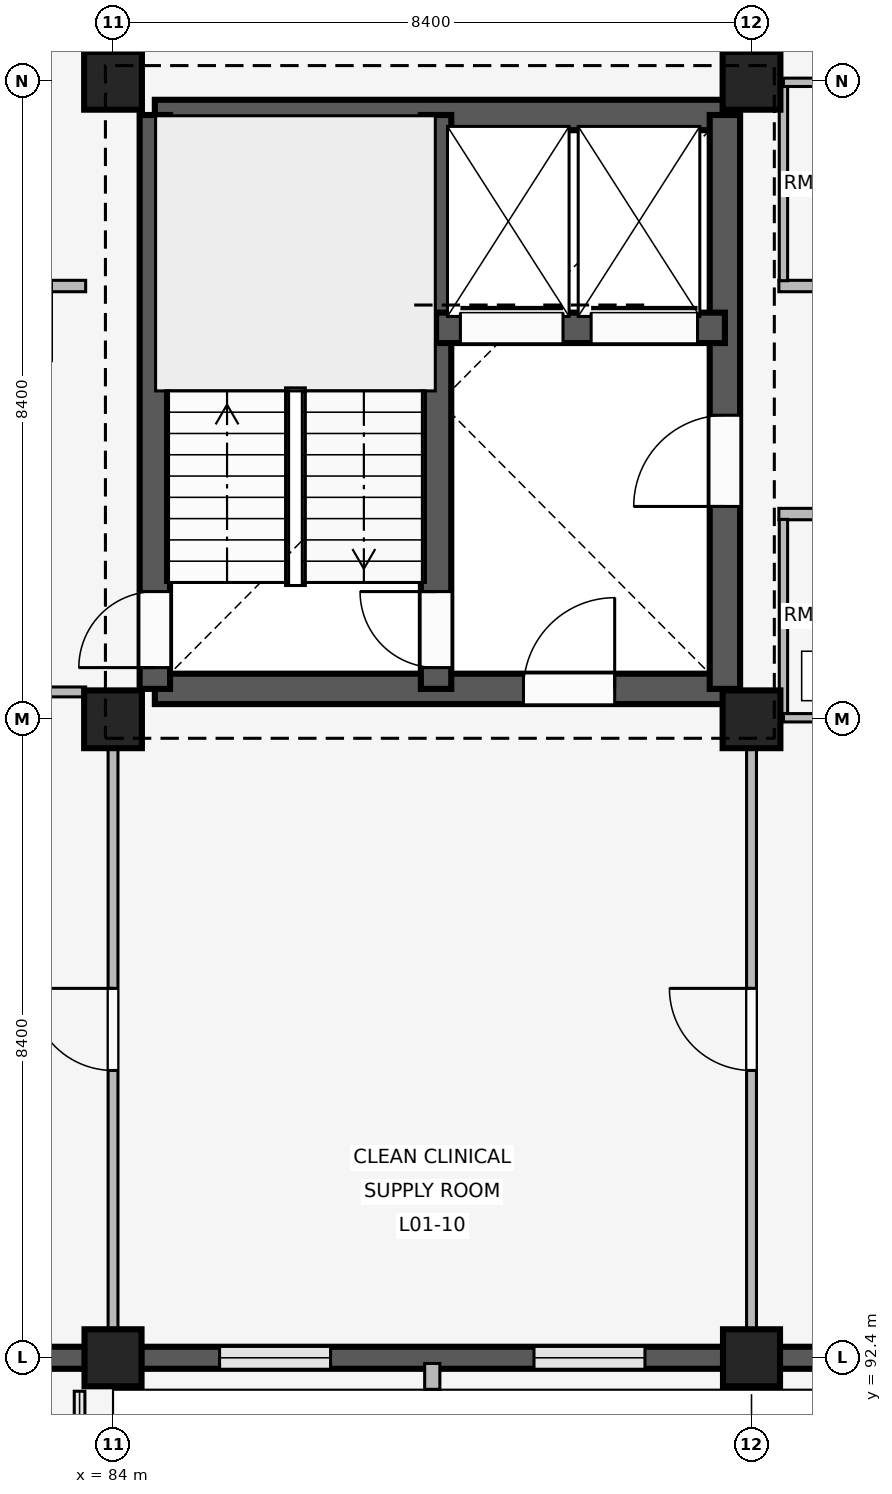
"""IFC4 building model, lengths in metres.
Left out: names, types, materials, properties, quantities, classifications, styles, units other than length and angle.
Written with IfcOpenShell. Run it as: python <this file> out.ifc"""

import sys

from ifc_helpers import new_model, si_unit, direction, frame, frame_2d, origin, origin_2d, place, context, subcontext, project, spatial, rectangle, extrude, element, fill, save


model = new_model("IFC4")
c1 = context("Model", 3, precision=1e-05, world=origin(), true_north=direction((0.0, 1.0)))
c2 = subcontext(c1, "Body", "Model", "MODEL_VIEW")
j1 = project(units=[si_unit("LENGTHUNIT", "METRE"), si_unit("PLANEANGLEUNIT", "RADIAN")], contexts=[c1])
p1 = place(None, origin())
s1 = spatial("IfcSite", under=j1, at=p1, CompositionType="ELEMENT")
p2 = place(p1, origin())
s2 = spatial("IfcBuilding", under=s1, at=p2, CompositionType="ELEMENT")
p3 = place(p2, frame((0.0, 0.0, 4.8)))
s3 = spatial("IfcBuildingStorey", under=s2, at=p3, CompositionType="ELEMENT", Elevation=4.8)
p4 = place(p3, frame((84.0, 92.4, 0.0), z_axis=(0.0, 0.0, 1.0), x_axis=(1.0, 0.0, 0.0)))
e1 = element("IfcColumn", 1, at=p4, inside=s3, PredefinedType="COLUMN", context=c2, shape_type="SweptSolid", body=[
    extrude(rectangle(XDim=0.75, YDim=0.75, at=origin_2d()), origin(), (0.0, 0.0, 1.0), 3.3),
])
for number, where, z_axis, x_axis in (
    (2, (84.0, 100.8, 0.0), (0.0, 0.0, 1.0), (1.0, 0.0, 0.0)),
    (3, (84.0, 109.2, 0.0), (0.0, 0.0, 1.0), (1.0, 0.0, 0.0)),
):
    element("IfcColumn", number, at=place(p3, frame(where, z_axis=z_axis, x_axis=x_axis)), inside=s3, PredefinedType="COLUMN", context=c2, shape_type="SweptSolid", body=[
        extrude(rectangle(XDim=0.76, YDim=0.76, at=origin_2d()), origin(), (0.0, 0.0, 1.0), 3.3),
    ])
p5 = place(p3, frame((92.4, 92.4, 0.0), z_axis=(0.0, 0.0, 1.0), x_axis=(1.0, 0.0, 0.0)))
e4 = element("IfcColumn", 4, at=p5, inside=s3, PredefinedType="COLUMN", context=c2, shape_type="SweptSolid", body=[
    extrude(rectangle(XDim=0.75, YDim=0.75, at=origin_2d()), origin(), (0.0, 0.0, 1.0), 3.3),
])
for number, where, z_axis, x_axis in (
    (5, (92.4, 100.8, 0.0), (0.0, 0.0, 1.0), (1.0, 0.0, 0.0)),
    (6, (92.4, 109.2, 0.0), (0.0, 0.0, 1.0), (1.0, 0.0, 0.0)),
):
    element("IfcColumn", number, at=place(p3, frame(where, z_axis=z_axis, x_axis=x_axis)), inside=s3, PredefinedType="COLUMN", context=c2, shape_type="SweptSolid", body=[
        extrude(rectangle(XDim=0.76, YDim=0.76, at=origin_2d()), origin(), (0.0, 0.0, 1.0), 3.3),
    ])
p6 = place(p3, frame((83.63, 92.4, 0.0), z_axis=(0.0, 0.0, 1.0), x_axis=(-1.0, 0.0, 0.0)))
e7 = element("IfcWall", 7, at=p6, inside=s3, PredefinedType="SOLIDWALL", context=c2, shape_type="SweptSolid", body=[
    extrude(rectangle(XDim=7.66, YDim=0.29, at=frame_2d((3.83, 0.0))), origin(), (0.0, 0.0, 1.0), 2.42),
])
p7 = place(p6, frame((2.88, 0.0, 0.0)))
e8 = element("IfcOpeningElement", 8, at=p7, cuts=e7, PredefinedType="OPENING", context=c2, shape_type="SweptSolid", body=[
    extrude(rectangle(XDim=1.9, YDim=2.3, at=frame_2d((0.95, 1.15))), frame((0.0, 0.155, 0.0), z_axis=(0.0, -1.0, 0.0), x_axis=(1.0, 0.0, 0.0)), (0.0, 0.0, 1.0), 0.31),
])
p8 = place(p3, frame((92.03, 92.4, 0.0), z_axis=(0.0, 0.0, 1.0), x_axis=(-1.0, 0.0, 0.0)))
e9 = element("IfcWall", 9, at=p8, inside=s3, PredefinedType="SOLIDWALL", context=c2, shape_type="SweptSolid", body=[
    extrude(rectangle(XDim=7.66, YDim=0.29, at=frame_2d((3.83, 0.0))), origin(), (0.0, 0.0, 1.0), 2.42),
])
p9 = place(p8, frame((1.032, 0.0, 0.85)))
e10 = element("IfcOpeningElement", 10, at=p9, cuts=e9, PredefinedType="OPENING", context=c2, shape_type="SweptSolid", body=[
    extrude(rectangle(XDim=1.46, YDim=0.85, at=frame_2d((0.73, 0.425))), frame((0.0, 0.155, 0.0), z_axis=(0.0, -1.0, 0.0), x_axis=(1.0, 0.0, 0.0)), (0.0, 0.0, 1.0), 0.31),
])
p10 = place(p8, frame((5.168, 0.0, 0.85)))
e11 = element("IfcOpeningElement", 11, at=p10, cuts=e9, PredefinedType="OPENING", context=c2, shape_type="SweptSolid", body=[
    extrude(rectangle(XDim=1.46, YDim=0.85, at=frame_2d((0.73, 0.425))), frame((0.0, 0.155, 0.0), z_axis=(0.0, -1.0, 0.0), x_axis=(1.0, 0.0, 0.0)), (0.0, 0.0, 1.0), 0.31),
])
p11 = place(p3, frame((88.2, 92.325, 0.0), z_axis=(0.0, 0.0, 1.0), x_axis=(0.0, -1.0, 0.0)))
e12 = element("IfcWall", 12, at=p11, inside=s3, PredefinedType="ELEMENTEDWALL", context=c2, shape_type="SweptSolid", body=[
    extrude(rectangle(XDim=0.34, YDim=0.2, at=frame_2d((0.17, 0.0))), origin(), (0.0, 0.0, 1.0), 2.4),
])
p12 = place(p3, frame((100.43, 92.4, 0.0), z_axis=(0.0, 0.0, 1.0), x_axis=(-1.0, 0.0, 0.0)))
e13 = element("IfcWall", 13, at=p12, inside=s3, PredefinedType="SOLIDWALL", context=c2, shape_type="SweptSolid", body=[
    extrude(rectangle(XDim=7.66, YDim=0.29, at=frame_2d((3.83, 0.0))), origin(), (0.0, 0.0, 1.0), 2.42),
])
p13 = place(p12, frame((0.952, 0.0, 0.85)))
e14 = element("IfcOpeningElement", 14, at=p13, cuts=e13, PredefinedType="OPENING", context=c2, shape_type="SweptSolid", body=[
    extrude(rectangle(XDim=1.62, YDim=0.95, at=frame_2d((0.81, 0.475))), frame((0.0, 0.155, 0.0), z_axis=(0.0, -1.0, 0.0), x_axis=(1.0, 0.0, 0.0)), (0.0, 0.0, 1.0), 0.31),
])
p14 = place(p12, frame((5.088, 0.0, 0.85)))
e15 = element("IfcOpeningElement", 15, at=p14, cuts=e13, PredefinedType="OPENING", context=c2, shape_type="SweptSolid", body=[
    extrude(rectangle(XDim=1.62, YDim=0.95, at=frame_2d((0.81, 0.475))), frame((0.0, 0.155, 0.0), z_axis=(0.0, -1.0, 0.0), x_axis=(1.0, 0.0, 0.0)), (0.0, 0.0, 1.0), 0.31),
])
p15 = place(p3, frame((84.55, 101.2, 0.0), z_axis=(0.0, 0.0, 1.0), x_axis=(1.0, 0.0, 0.0)))
e16 = element("IfcWall", 16, at=p15, inside=s3, PredefinedType="SHEAR", context=c2, shape_type="SweptSolid", body=[
    extrude(rectangle(XDim=7.5, YDim=0.4, at=frame_2d((3.75, 0.0))), origin(), (0.0, 0.0, 1.0), 3.02),
])
p16 = place(p15, frame((4.85, 0.0, 0.0)))
e17 = element("IfcOpeningElement", 17, at=p16, cuts=e16, PredefinedType="OPENING", context=c2, shape_type="SweptSolid", body=[
    extrude(rectangle(XDim=1.2, YDim=2.1, at=frame_2d((0.6, 1.05))), frame((0.0, 0.21, 0.0), z_axis=(0.0, -1.0, 0.0), x_axis=(1.0, 0.0, 0.0)), (0.0, 0.0, 1.0), 0.42),
])
p17 = place(p3, frame((84.55, 108.75, 0.0), z_axis=(0.0, 0.0, 1.0), x_axis=(1.0, 0.0, 0.0)))
e18 = element("IfcWall", 18, at=p17, inside=s3, PredefinedType="SHEAR", context=c2, shape_type="SweptSolid", body=[
    extrude(rectangle(XDim=7.5, YDim=0.4, at=frame_2d((3.75, 0.0))), origin(), (0.0, 0.0, 1.0), 3.02),
])
p18 = place(p3, frame((84.55, 101.2, 0.0), z_axis=(0.0, 0.0, 1.0), x_axis=(0.0, 1.0, 0.0)))
e19 = element("IfcWall", 19, at=p18, inside=s3, PredefinedType="SHEAR", context=c2, shape_type="SweptSolid", body=[
    extrude(rectangle(XDim=7.55, YDim=0.4, at=frame_2d((3.775, 0.0))), origin(), (0.0, 0.0, 1.0), 3.02),
])
p19 = place(p18, frame((0.28, 0.0, 0.0)))
e20 = element("IfcOpeningElement", 20, at=p19, cuts=e19, PredefinedType="OPENING", context=c2, shape_type="SweptSolid", body=[
    extrude(rectangle(XDim=1.0, YDim=2.15, at=frame_2d((0.5, 1.075))), frame((0.0, 0.21, 0.0), z_axis=(0.0, -1.0, 0.0), x_axis=(1.0, 0.0, 0.0)), (0.0, 0.0, 1.0), 0.42),
])
p20 = place(p3, frame((92.05, 101.2, 0.0), z_axis=(0.0, 0.0, 1.0), x_axis=(0.0, 1.0, 0.0)))
e21 = element("IfcWall", 21, at=p20, inside=s3, PredefinedType="SHEAR", context=c2, shape_type="SweptSolid", body=[
    extrude(rectangle(XDim=7.55, YDim=0.4, at=frame_2d((3.775, 0.0))), origin(), (0.0, 0.0, 1.0), 3.02),
])
p21 = place(p20, frame((2.4, 0.0, 0.0)))
e22 = element("IfcOpeningElement", 22, at=p21, cuts=e21, PredefinedType="OPENING", context=c2, shape_type="SweptSolid", body=[
    extrude(rectangle(XDim=1.2, YDim=2.2, at=frame_2d((0.6, 1.1))), frame((0.0, 0.21, 0.0), z_axis=(0.0, -1.0, 0.0), x_axis=(1.0, 0.0, 0.0)), (0.0, 0.0, 1.0), 0.42),
])
p22 = place(p3, frame((88.25, 101.2, 0.0), z_axis=(0.0, 0.0, 1.0), x_axis=(0.0, 1.0, 0.0)))
e23 = element("IfcWall", 23, at=p22, inside=s3, PredefinedType="SHEAR", context=c2, shape_type="SweptSolid", body=[
    extrude(rectangle(XDim=7.55, YDim=0.4, at=frame_2d((3.775, 0.0))), origin(), (0.0, 0.0, 1.0), 3.02),
])
p23 = place(p22, frame((0.28, 0.0, 0.0)))
e24 = element("IfcOpeningElement", 24, at=p23, cuts=e23, PredefinedType="OPENING", context=c2, shape_type="SweptSolid", body=[
    extrude(rectangle(XDim=1.0, YDim=2.15, at=frame_2d((0.5, 1.075))), frame((0.0, 0.21, 0.0), z_axis=(0.0, -1.0, 0.0), x_axis=(1.0, 0.0, 0.0)), (0.0, 0.0, 1.0), 0.42),
])
p24 = place(p3, frame((88.25, 105.95, 0.0), z_axis=(0.0, 0.0, 1.0), x_axis=(1.0, 0.0, 0.0)))
e25 = element("IfcWall", 25, at=p24, inside=s3, PredefinedType="SHEAR", context=c2, shape_type="SweptSolid", body=[
    extrude(rectangle(XDim=3.8, YDim=0.4, at=frame_2d((1.9, 0.0))), origin(), (0.0, 0.0, 1.0), 3.02),
])
p25 = place(p24, frame((0.32, 0.0, 0.0)))
e26 = element("IfcOpeningElement", 26, at=p25, cuts=e25, PredefinedType="OPENING", context=c2, shape_type="SweptSolid", body=[
    extrude(rectangle(XDim=1.35, YDim=2.25, at=frame_2d((0.675, 1.125))), frame((0.0, 0.21, 0.0), z_axis=(0.0, -1.0, 0.0), x_axis=(1.0, 0.0, 0.0)), (0.0, 0.0, 1.0), 0.42),
])
p26 = place(p24, frame((2.04, 0.0, 0.0)))
e27 = element("IfcOpeningElement", 27, at=p26, cuts=e25, PredefinedType="OPENING", context=c2, shape_type="SweptSolid", body=[
    extrude(rectangle(XDim=1.4, YDim=2.25, at=frame_2d((0.7, 1.125))), frame((0.0, 0.21, 0.0), z_axis=(0.0, -1.0, 0.0), x_axis=(1.0, 0.0, 0.0)), (0.0, 0.0, 1.0), 0.42),
])
p27 = place(p3, frame((81.46, 101.16, 0.0), z_axis=(0.0, 0.0, 1.0), x_axis=(1.0, 0.0, 0.0)))
e28 = element("IfcWall", 28, at=p27, inside=s3, PredefinedType="PARTITIONING", context=c2, shape_type="SweptSolid", body=[
    extrude(rectangle(XDim=2.18, YDim=0.13, at=frame_2d((1.09, 0.0))), origin(), (0.0, 0.0, 1.0), 2.4),
])
p28 = place(p3, frame((83.64, 106.5, 0.0), z_axis=(0.0, 0.0, 1.0), x_axis=(-1.0, 0.0, 0.0)))
e29 = element("IfcWall", 29, at=p28, inside=s3, PredefinedType="PARTITIONING", context=c2, shape_type="SweptSolid", body=[
    extrude(rectangle(XDim=7.96, YDim=0.15, at=frame_2d((3.98, 0.0))), origin(), (0.0, 0.0, 1.0), 2.4),
])
p29 = place(p28, frame((0.45, 0.0, 0.0)))
e30 = element("IfcOpeningElement", 30, at=p29, cuts=e29, PredefinedType="OPENING", context=c2, shape_type="SweptSolid", body=[
    extrude(rectangle(XDim=1.0, YDim=2.15, at=frame_2d((0.5, 1.075))), frame((0.0, 0.085, 0.0), z_axis=(0.0, -1.0, 0.0), x_axis=(1.0, 0.0, 0.0)), (0.0, 0.0, 1.0), 0.17),
])
p30 = place(p28, frame((4.15, 0.0, 0.0)))
e31 = element("IfcOpeningElement", 31, at=p30, cuts=e29, PredefinedType="OPENING", context=c2, shape_type="SweptSolid", body=[
    extrude(rectangle(XDim=1.0, YDim=2.15, at=frame_2d((0.5, 1.075))), frame((0.0, 0.085, 0.0), z_axis=(0.0, -1.0, 0.0), x_axis=(1.0, 0.0, 0.0)), (0.0, 0.0, 1.0), 0.17),
])
p31 = place(p3, frame((84.0, 92.54, 0.0), z_axis=(0.0, 0.0, 1.0), x_axis=(0.0, 1.0, 0.0)))
e32 = element("IfcWall", 32, at=p31, inside=s3, PredefinedType="PARTITIONING", context=c2, shape_type="SweptSolid", body=[
    extrude(rectangle(XDim=8.21, YDim=0.13, at=frame_2d((4.105, 0.0))), origin(), (0.0, 0.0, 1.0), 2.4),
])
p32 = place(p31, frame((3.64, 0.0, 0.0)))
e33 = element("IfcOpeningElement", 33, at=p32, cuts=e32, PredefinedType="OPENING", context=c2, shape_type="SweptSolid", body=[
    extrude(rectangle(XDim=1.08, YDim=2.15, at=frame_2d((0.54, 1.075))), frame((0.0, 0.075, 0.0), z_axis=(0.0, -1.0, 0.0), x_axis=(1.0, 0.0, 0.0)), (0.0, 0.0, 1.0), 0.15),
])
p33 = place(p3, frame((84.0, 109.55, 0.0), z_axis=(0.0, 0.0, 1.0), x_axis=(0.0, 1.0, 0.0)))
e34 = element("IfcWall", 34, at=p33, inside=s3, PredefinedType="PARTITIONING", context=c2, shape_type="SweptSolid", body=[
    extrude(rectangle(XDim=7.91, YDim=0.13, at=frame_2d((3.955, 0.0))), origin(), (0.0, 0.0, 1.0), 2.4),
])
p34 = place(p33, frame((3.4, 0.0, 0.0)))
e35 = element("IfcOpeningElement", 35, at=p34, cuts=e34, PredefinedType="OPENING", context=c2, shape_type="SweptSolid", body=[
    extrude(rectangle(XDim=1.05, YDim=2.2, at=frame_2d((0.525, 1.1))), frame((0.0, 0.075, 0.0), z_axis=(0.0, -1.0, 0.0), x_axis=(1.0, 0.0, 0.0)), (0.0, 0.0, 1.0), 0.15),
])
p35 = place(p3, frame((92.4, 92.54, 0.0), z_axis=(0.0, 0.0, 1.0), x_axis=(0.0, 1.0, 0.0)))
e36 = element("IfcWall", 36, at=p35, inside=s3, PredefinedType="PARTITIONING", context=c2, shape_type="SweptSolid", body=[
    extrude(rectangle(XDim=8.21, YDim=0.13, at=frame_2d((4.105, 0.0))), origin(), (0.0, 0.0, 1.0), 2.4),
])
p36 = place(p35, frame((3.64, 0.0, 0.0)))
e37 = element("IfcOpeningElement", 37, at=p36, cuts=e36, PredefinedType="OPENING", context=c2, shape_type="SweptSolid", body=[
    extrude(rectangle(XDim=1.08, YDim=2.15, at=frame_2d((0.54, 1.075))), frame((0.0, 0.075, 0.0), z_axis=(0.0, -1.0, 0.0), x_axis=(1.0, 0.0, 0.0)), (0.0, 0.0, 1.0), 0.15),
])
p37 = place(p3, frame((92.4, 109.55, 0.0), z_axis=(0.0, 0.0, 1.0), x_axis=(0.0, 1.0, 0.0)))
e38 = element("IfcWall", 38, at=p37, inside=s3, PredefinedType="PARTITIONING", context=c2, shape_type="SweptSolid", body=[
    extrude(rectangle(XDim=7.91, YDim=0.13, at=frame_2d((3.955, 0.0))), origin(), (0.0, 0.0, 1.0), 2.4),
])
p38 = place(p37, frame((3.4, 0.0, 0.0)))
e39 = element("IfcOpeningElement", 39, at=p38, cuts=e38, PredefinedType="OPENING", context=c2, shape_type="SweptSolid", body=[
    extrude(rectangle(XDim=1.05, YDim=2.2, at=frame_2d((0.525, 1.1))), frame((0.0, 0.075, 0.0), z_axis=(0.0, -1.0, 0.0), x_axis=(1.0, 0.0, 0.0)), (0.0, 0.0, 1.0), 0.15),
])
p39 = place(p3, frame((92.76, 103.5, 0.0), z_axis=(0.0, 0.0, 1.0), x_axis=(1.0, 0.0, 0.0)))
e40 = element("IfcWall", 40, at=p39, inside=s3, PredefinedType="PARTITIONING", context=c2, shape_type="SweptSolid", body=[
    extrude(rectangle(XDim=7.96, YDim=0.15, at=frame_2d((3.98, 0.0))), origin(), (0.0, 0.0, 1.0), 2.4),
])
p40 = place(p39, frame((2.25, 0.0, 0.0)))
e41 = element("IfcOpeningElement", 41, at=p40, cuts=e40, PredefinedType="OPENING", context=c2, shape_type="SweptSolid", body=[
    extrude(rectangle(XDim=1.0, YDim=2.15, at=frame_2d((0.5, 1.075))), frame((0.0, 0.085, 0.0), z_axis=(0.0, -1.0, 0.0), x_axis=(1.0, 0.0, 0.0)), (0.0, 0.0, 1.0), 0.17),
])
p41 = place(p39, frame((5.95, 0.0, 0.0)))
e42 = element("IfcOpeningElement", 42, at=p41, cuts=e40, PredefinedType="OPENING", context=c2, shape_type="SweptSolid", body=[
    extrude(rectangle(XDim=1.0, YDim=2.15, at=frame_2d((0.5, 1.075))), frame((0.0, 0.085, 0.0), z_axis=(0.0, -1.0, 0.0), x_axis=(1.0, 0.0, 0.0)), (0.0, 0.0, 1.0), 0.17),
])
p42 = place(p3, frame((92.82, 100.82, 0.0), z_axis=(0.0, 0.0, 1.0), x_axis=(0.0, 1.0, 0.0)))
e43 = element("IfcWall", 43, at=p42, inside=s3, PredefinedType="PARTITIONING", context=c2, shape_type="SweptSolid", body=[
    extrude(rectangle(XDim=2.61, YDim=0.11, at=frame_2d((1.305, 0.0))), origin(), (0.0, 0.0, 1.0), 2.4),
])
p43 = place(p3, frame((92.82, 100.82, 0.0), z_axis=(0.0, 0.0, 1.0), x_axis=(1.0, 0.0, 0.0)))
e44 = element("IfcWall", 44, at=p43, inside=s3, PredefinedType="PARTITIONING", context=c2, shape_type="SweptSolid", body=[
    extrude(rectangle(XDim=1.98, YDim=0.11, at=frame_2d((0.99, 0.0))), origin(), (0.0, 0.0, 1.0), 2.4),
])
p44 = place(p43, frame((0.54, 0.0, 0.0)))
e45 = element("IfcOpeningElement", 45, at=p44, cuts=e44, PredefinedType="OPENING", context=c2, shape_type="SweptSolid", body=[
    extrude(rectangle(XDim=0.9, YDim=2.1, at=frame_2d((0.45, 1.05))), frame((0.0, 0.065, 0.0), z_axis=(0.0, -1.0, 0.0), x_axis=(1.0, 0.0, 0.0)), (0.0, 0.0, 1.0), 0.13),
])
p45 = place(p3, frame((100.72, 106.5, 0.0), z_axis=(0.0, 0.0, 1.0), x_axis=(-1.0, 0.0, 0.0)))
e46 = element("IfcWall", 46, at=p45, inside=s3, PredefinedType="PARTITIONING", context=c2, shape_type="SweptSolid", body=[
    extrude(rectangle(XDim=7.96, YDim=0.15, at=frame_2d((3.98, 0.0))), origin(), (0.0, 0.0, 1.0), 2.4),
])
p46 = place(p45, frame((0.73, 0.0, 0.0)))
e47 = element("IfcOpeningElement", 47, at=p46, cuts=e46, PredefinedType="OPENING", context=c2, shape_type="SweptSolid", body=[
    extrude(rectangle(XDim=1.0, YDim=2.15, at=frame_2d((0.5, 1.075))), frame((0.0, 0.085, 0.0), z_axis=(0.0, -1.0, 0.0), x_axis=(1.0, 0.0, 0.0)), (0.0, 0.0, 1.0), 0.17),
])
p47 = place(p45, frame((4.43, 0.0, 0.0)))
e48 = element("IfcOpeningElement", 48, at=p47, cuts=e46, PredefinedType="OPENING", context=c2, shape_type="SweptSolid", body=[
    extrude(rectangle(XDim=1.0, YDim=2.15, at=frame_2d((0.5, 1.075))), frame((0.0, 0.085, 0.0), z_axis=(0.0, -1.0, 0.0), x_axis=(1.0, 0.0, 0.0)), (0.0, 0.0, 1.0), 0.17),
])
p48 = place(p3, frame((92.82, 106.57, 0.0), z_axis=(0.0, 0.0, 1.0), x_axis=(0.0, 1.0, 0.0)))
e49 = element("IfcWall", 49, at=p48, inside=s3, PredefinedType="PARTITIONING", context=c2, shape_type="SweptSolid", body=[
    extrude(rectangle(XDim=2.61, YDim=0.11, at=frame_2d((1.305, 0.0))), origin(), (0.0, 0.0, 1.0), 2.4),
])
p49 = place(p3, frame((92.82, 109.18, 0.0), z_axis=(0.0, 0.0, 1.0), x_axis=(1.0, 0.0, 0.0)))
e50 = element("IfcWall", 50, at=p49, inside=s3, PredefinedType="PARTITIONING", context=c2, shape_type="SweptSolid", body=[
    extrude(rectangle(XDim=1.98, YDim=0.11, at=frame_2d((0.99, 0.0))), origin(), (0.0, 0.0, 1.0), 2.4),
])
p50 = place(p49, frame((0.54, 0.0, 0.0)))
e51 = element("IfcOpeningElement", 51, at=p50, cuts=e50, PredefinedType="OPENING", context=c2, shape_type="SweptSolid", body=[
    extrude(rectangle(XDim=0.9, YDim=2.1, at=frame_2d((0.45, 1.05))), frame((0.0, 0.065, 0.0), z_axis=(0.0, -1.0, 0.0), x_axis=(1.0, 0.0, 0.0)), (0.0, 0.0, 1.0), 0.13),
])
p51 = place(p9, origin())
e52 = element("IfcWindow", 52, at=p51, inside=s3, PartitioningType="SINGLE_PANEL", PredefinedType="WINDOW", context=c2, shape_type="SweptSolid", body=[
    extrude(rectangle(XDim=1.46, YDim=0.85, at=frame_2d((0.73, 0.425))), frame((0.0, 0.03, 0.0), z_axis=(0.0, -1.0, 0.0), x_axis=(1.0, 0.0, 0.0)), (0.0, 0.0, 1.0), 0.06),
])
fill(e10, e52)
p52 = place(p10, origin())
e53 = element("IfcWindow", 53, at=p52, inside=s3, PartitioningType="SINGLE_PANEL", PredefinedType="WINDOW", context=c2, shape_type="SweptSolid", body=[
    extrude(rectangle(XDim=1.46, YDim=0.85, at=frame_2d((0.73, 0.425))), frame((0.0, 0.03, 0.0), z_axis=(0.0, -1.0, 0.0), x_axis=(1.0, 0.0, 0.0)), (0.0, 0.0, 1.0), 0.06),
])
fill(e11, e53)
p53 = place(p21, origin())
e54 = element("IfcDoor", 54, at=p53, inside=s3, OperationType="SINGLE_SWING_LEFT", PredefinedType="DOOR", context=c2, shape_type="SweptSolid", body=[
    extrude(rectangle(XDim=1.2, YDim=2.2, at=frame_2d((0.6, 1.1))), frame((0.0, 0.025, 0.0), z_axis=(0.0, -1.0, 0.0), x_axis=(1.0, 0.0, 0.0)), (0.0, 0.0, 1.0), 0.05),
])
fill(e22, e54)
p54 = place(p16, origin())
e55 = element("IfcDoor", 55, at=p54, inside=s3, OperationType="SINGLE_SWING_RIGHT", PredefinedType="DOOR", context=c2, shape_type="SweptSolid", body=[
    extrude(rectangle(XDim=1.2, YDim=2.1, at=frame_2d((0.6, 1.05))), frame((0.0, 0.025, 0.0), z_axis=(0.0, -1.0, 0.0), x_axis=(1.0, 0.0, 0.0)), (0.0, 0.0, 1.0), 0.05),
])
fill(e17, e55)
p55 = place(p19, origin())
e56 = element("IfcDoor", 56, at=p55, inside=s3, OperationType="SINGLE_SWING_LEFT", PredefinedType="DOOR", context=c2, shape_type="SweptSolid", body=[
    extrude(rectangle(XDim=1.0, YDim=2.15, at=frame_2d((0.5, 1.075))), frame((0.0, 0.025, 0.0), z_axis=(0.0, -1.0, 0.0), x_axis=(1.0, 0.0, 0.0)), (0.0, 0.0, 1.0), 0.05),
])
fill(e20, e56)
p56 = place(p23, origin())
e57 = element("IfcDoor", 57, at=p56, inside=s3, OperationType="SINGLE_SWING_RIGHT", PredefinedType="DOOR", context=c2, shape_type="SweptSolid", body=[
    extrude(rectangle(XDim=1.0, YDim=2.15, at=frame_2d((0.5, 1.075))), frame((0.0, 0.025, 0.0), z_axis=(0.0, -1.0, 0.0), x_axis=(1.0, 0.0, 0.0)), (0.0, 0.0, 1.0), 0.05),
])
fill(e24, e57)
p57 = place(p25, origin())
e58 = element("IfcDoor", 58, at=p57, inside=s3, OperationType="SLIDING_TO_LEFT", PredefinedType="DOOR", context=c2, shape_type="SweptSolid", body=[
    extrude(rectangle(XDim=1.35, YDim=2.25, at=frame_2d((0.675, 1.125))), frame((0.0, 0.025, 0.0), z_axis=(0.0, -1.0, 0.0), x_axis=(1.0, 0.0, 0.0)), (0.0, 0.0, 1.0), 0.05),
])
fill(e26, e58)
p58 = place(p26, origin())
e59 = element("IfcDoor", 59, at=p58, inside=s3, OperationType="SLIDING_TO_LEFT", PredefinedType="DOOR", context=c2, shape_type="SweptSolid", body=[
    extrude(rectangle(XDim=1.4, YDim=2.25, at=frame_2d((0.7, 1.125))), frame((0.0, 0.025, 0.0), z_axis=(0.0, -1.0, 0.0), x_axis=(1.0, 0.0, 0.0)), (0.0, 0.0, 1.0), 0.05),
])
fill(e27, e59)
p59 = place(p32, origin())
e60 = element("IfcDoor", 60, at=p59, inside=s3, OperationType="SINGLE_SWING_RIGHT", PredefinedType="DOOR", context=c2, shape_type="SweptSolid", body=[
    extrude(rectangle(XDim=1.08, YDim=2.15, at=frame_2d((0.54, 1.075))), frame((0.0, 0.025, 0.0), z_axis=(0.0, -1.0, 0.0), x_axis=(1.0, 0.0, 0.0)), (0.0, 0.0, 1.0), 0.05),
])
fill(e33, e60)
p60 = place(p36, origin())
e61 = element("IfcDoor", 61, at=p60, inside=s3, OperationType="SINGLE_SWING_RIGHT", PredefinedType="DOOR", context=c2, shape_type="SweptSolid", body=[
    extrude(rectangle(XDim=1.08, YDim=2.15, at=frame_2d((0.54, 1.075))), frame((0.0, 0.025, 0.0), z_axis=(0.0, -1.0, 0.0), x_axis=(1.0, 0.0, 0.0)), (0.0, 0.0, 1.0), 0.05),
])
fill(e37, e61)
save(model, sys.argv[1])
